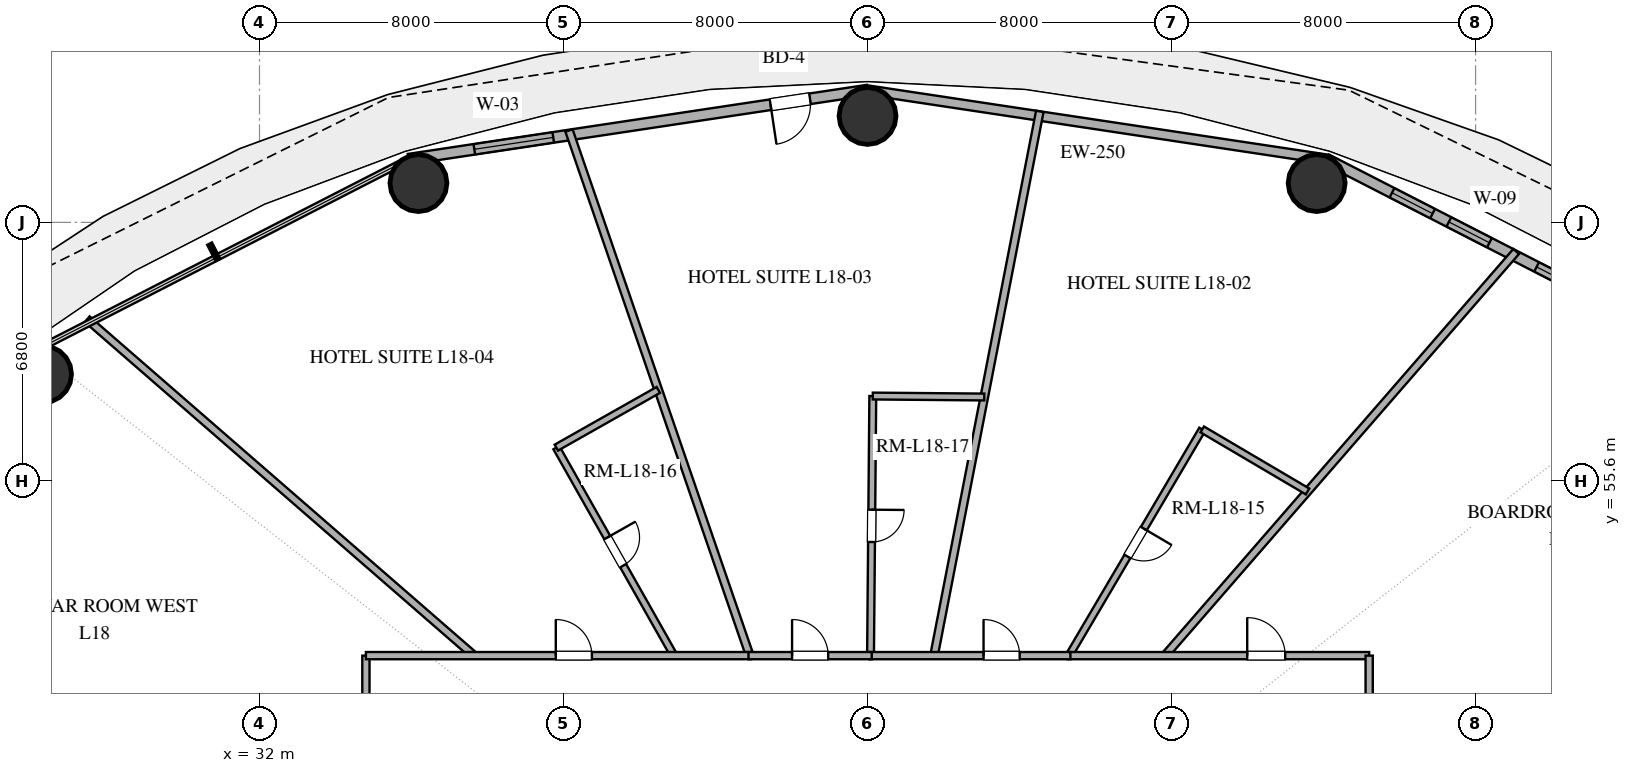
"""IFC4 building model, lengths in metres.
Left out: names, types, materials, properties, quantities, classifications, styles, units other than length and angle.
Written with IfcOpenShell. Run it as: python <this file> out.ifc"""

import sys

from ifc_helpers import new_model, si_unit, direction, frame, frame_2d, origin, origin_2d, place, context, subcontext, project, spatial, rectangle, hollow_circle, extrude, element, fill, save


model = new_model("IFC4")
c1 = context("Model", 3, precision=1e-05, world=origin(), true_north=direction((0.0, 1.0)))
c2 = subcontext(c1, "Body", "Model", "MODEL_VIEW")
j1 = project(units=[si_unit("LENGTHUNIT", "METRE"), si_unit("PLANEANGLEUNIT", "RADIAN")], contexts=[c1])
p1 = place(None, origin())
s1 = spatial("IfcSite", under=j1, at=p1, CompositionType="ELEMENT")
p2 = place(p1, origin())
s2 = spatial("IfcBuilding", under=s1, at=p2, CompositionType="ELEMENT")
p3 = place(p2, frame((0.0, 0.0, 75.0)))
s3 = spatial("IfcBuildingStorey", under=s2, at=p3, CompositionType="ELEMENT", Elevation=75.0)
for number, where, z_axis, x_axis in (
    (1, (59.818, 63.434, 0.0), (0.0, 0.0, 1.0), (1.0, 0.0, 0.0)),
    (2, (48.0, 65.2, 0.0), (0.0, 0.0, 1.0), (1.0, 0.0, 0.0)),
    (3, (36.182, 63.434, 0.0), (0.0, 0.0, 1.0), (1.0, 0.0, 0.0)),
    (4, (26.303, 58.405, 0.0), (0.0, 0.0, 1.0), (1.0, 0.0, 0.0)),
):
    element("IfcColumn", number, at=place(p3, frame(where, z_axis=z_axis, x_axis=x_axis)), inside=s3, PredefinedType="COLUMN", context=c2, shape_type="SweptSolid", body=[
        extrude(hollow_circle(Radius=0.75, WallThickness=0.04, at=origin_2d()), origin(), (0.0, 0.0, 1.0), 3.25),
    ])
p4 = place(p3, frame((70.174, 58.886, 0.0), z_axis=(0.0, 0.0, 1.0), x_axis=(-0.889853976658, 0.456245438581, 0.0)))
e5 = element("IfcWall", 5, at=p4, inside=s3, PredefinedType="SOLIDWALL", context=c2, shape_type="SweptSolid", body=[
    extrude(rectangle(XDim=11.346, YDim=0.28, at=frame_2d((5.673, 0.0))), origin(), (0.0, 0.0, 1.0), 3.25),
])
p5 = place(p4, frame((2.02, 0.0, 0.85)))
e6 = element("IfcOpeningElement", 6, at=p5, cuts=e5, PredefinedType="OPENING", context=c2, shape_type="SweptSolid", body=[
    extrude(rectangle(XDim=1.35, YDim=1.8, at=frame_2d((0.675, 0.9))), frame((0.0, 0.15, 0.0), z_axis=(0.0, -1.0, 0.0), x_axis=(1.0, 0.0, 0.0)), (0.0, 0.0, 1.0), 0.3),
])
p6 = place(p4, frame((3.784, 0.0, 0.85)))
e7 = element("IfcOpeningElement", 7, at=p6, cuts=e5, PredefinedType="OPENING", context=c2, shape_type="SweptSolid", body=[
    extrude(rectangle(XDim=1.35, YDim=1.8, at=frame_2d((0.675, 0.9))), frame((0.0, 0.15, 0.0), z_axis=(0.0, -1.0, 0.0), x_axis=(1.0, 0.0, 0.0)), (0.0, 0.0, 1.0), 0.3),
])
p7 = place(p4, frame((6.529, 0.0, 0.85)))
e8 = element("IfcOpeningElement", 8, at=p7, cuts=e5, PredefinedType="OPENING", context=c2, shape_type="SweptSolid", body=[
    extrude(rectangle(XDim=1.2, YDim=1.8, at=frame_2d((0.6, 0.9))), frame((0.0, 0.15, 0.0), z_axis=(0.0, -1.0, 0.0), x_axis=(1.0, 0.0, 0.0)), (0.0, 0.0, 1.0), 0.3),
])
p8 = place(p4, frame((8.21, 0.0, 0.85)))
e9 = element("IfcOpeningElement", 9, at=p8, cuts=e5, PredefinedType="OPENING", context=c2, shape_type="SweptSolid", body=[
    extrude(rectangle(XDim=1.2, YDim=1.8, at=frame_2d((0.6, 0.9))), frame((0.0, 0.15, 0.0), z_axis=(0.0, -1.0, 0.0), x_axis=(1.0, 0.0, 0.0)), (0.0, 0.0, 1.0), 0.3),
])
p9 = place(p3, frame((60.078, 64.062, 0.0), z_axis=(0.0, 0.0, 1.0), x_axis=(-0.988864835849, 0.148816452121, 0.0)))
e10 = element("IfcWall", 10, at=p9, inside=s3, PredefinedType="SOLIDWALL", context=c2, shape_type="SweptSolid", body=[
    extrude(rectangle(XDim=12.214, YDim=0.25, at=frame_2d((6.107, 0.0))), origin(), (0.0, 0.0, 1.0), 3.25),
])
p10 = place(p3, frame((48.0, 65.88, 0.0), z_axis=(0.0, 0.0, 1.0), x_axis=(-0.988864835849, -0.148816452121, 0.0)))
e11 = element("IfcWall", 11, at=p10, inside=s3, PredefinedType="SOLIDWALL", context=c2, shape_type="SweptSolid", body=[
    extrude(rectangle(XDim=12.214, YDim=0.28, at=frame_2d((6.107, 0.0))), origin(), (0.0, 0.0, 1.0), 3.25),
])
p11 = place(p10, frame((1.531, 0.0, 0.0)))
e12 = element("IfcOpeningElement", 12, at=p11, cuts=e11, PredefinedType="OPENING", context=c2, shape_type="SweptSolid", body=[
    extrude(rectangle(XDim=1.05, YDim=2.2, at=frame_2d((0.525, 1.1))), frame((0.0, 0.15, 0.0), z_axis=(0.0, -1.0, 0.0), x_axis=(1.0, 0.0, 0.0)), (0.0, 0.0, 1.0), 0.3),
])
p12 = place(p10, frame((8.364, 0.0, 0.85)))
e13 = element("IfcOpeningElement", 13, at=p12, cuts=e11, PredefinedType="OPENING", context=c2, shape_type="SweptSolid", body=[
    extrude(rectangle(XDim=2.1, YDim=2.2, at=frame_2d((1.05, 1.1))), frame((0.0, 0.15, 0.0), z_axis=(0.0, -1.0, 0.0), x_axis=(1.0, 0.0, 0.0)), (0.0, 0.0, 1.0), 0.3),
])
p13 = place(p3, frame((61.2, 46.545, 0.0), z_axis=(0.0, 0.0, 1.0), x_axis=(0.945518845989, 0.325567369186, 0.0)))
e14 = element("IfcWall", 14, at=p13, inside=s3, PredefinedType="PARTITIONING", context=c2, shape_type="SweptSolid", body=[
    extrude(rectangle(XDim=15.909, YDim=0.2, at=frame_2d((7.955, 0.0))), origin(), (0.0, 0.0, 1.0), 2.61),
])
p14 = place(p3, frame((37.647, 51.0, 0.0), z_axis=(0.0, 0.0, 1.0), x_axis=(-0.754713815472, 0.656054156862, 0.0)))
e15 = element("IfcWall", 15, at=p14, inside=s3, PredefinedType="PARTITIONING", context=c2, shape_type="SweptSolid", body=[
    extrude(rectangle(XDim=13.491, YDim=0.2, at=frame_2d((6.746, 0.0))), origin(), (0.0, 0.0, 1.0), 2.61),
])
p15 = place(p3, frame((55.823, 51.0, 0.0), z_axis=(0.0, 0.0, 1.0), x_axis=(0.656066321773, 0.754703240641, 0.0)))
e16 = element("IfcWall", 16, at=p15, inside=s3, PredefinedType="PARTITIONING", context=c2, shape_type="SweptSolid", body=[
    extrude(rectangle(XDim=14.091, YDim=0.2, at=frame_2d((7.045, 0.0))), origin(), (0.0, 0.0, 1.0), 2.61),
])
p16 = place(p3, frame((49.749, 51.0, 0.0), z_axis=(0.0, 0.0, 1.0), x_axis=(0.190815454206, 0.981625927956, 0.0)))
e17 = element("IfcWall", 17, at=p16, inside=s3, PredefinedType="PARTITIONING", context=c2, shape_type="SweptSolid", body=[
    extrude(rectangle(XDim=14.587, YDim=0.2, at=frame_2d((7.293, 0.0))), origin(), (0.0, 0.0, 1.0), 2.61),
])
p17 = place(p3, frame((44.901, 51.0, 0.0), z_axis=(0.0, 0.0, 1.0), x_axis=(-0.325569992405, 0.945517942741, 0.0)))
e18 = element("IfcWall", 18, at=p17, inside=s3, PredefinedType="PARTITIONING", context=c2, shape_type="SweptSolid", body=[
    extrude(rectangle(XDim=14.613, YDim=0.2, at=frame_2d((7.307, 0.0))), origin(), (0.0, 0.0, 1.0), 2.61),
])
p18 = place(p3, frame((56.807, 56.952, 0.0), z_axis=(0.0, 0.0, 1.0), x_axis=(-0.507529744585, -0.861634236995, 0.0)))
e19 = element("IfcWall", 19, at=p18, inside=s3, PredefinedType="PLUMBINGWALL", context=c2, shape_type="SweptSolid", body=[
    extrude(rectangle(XDim=6.908, YDim=0.18, at=frame_2d((3.454, 0.0))), origin(), (0.0, 0.0, 1.0), 2.61),
])
p19 = place(p18, frame((3.029, 0.0, 0.0)))
e20 = element("IfcOpeningElement", 20, at=p19, cuts=e19, PredefinedType="OPENING", context=c2, shape_type="SweptSolid", body=[
    extrude(rectangle(XDim=0.85, YDim=2.1, at=frame_2d((0.425, 1.05))), frame((0.0, 0.1, 0.0), z_axis=(0.0, -1.0, 0.0), x_axis=(1.0, 0.0, 0.0)), (0.0, 0.0, 1.0), 0.2),
])
p20 = place(p3, frame((48.138, 57.83, 0.0), z_axis=(0.0, 0.0, 1.0), x_axis=(-0.008721118088, -0.999961970327, 0.0)))
e21 = element("IfcWall", 21, at=p20, inside=s3, PredefinedType="PLUMBINGWALL", context=c2, shape_type="SweptSolid", body=[
    extrude(rectangle(XDim=6.831, YDim=0.18, at=frame_2d((3.415, 0.0))), origin(), (0.0, 0.0, 1.0), 2.61),
])
p21 = place(p20, frame((2.99, 0.0, 0.0)))
e22 = element("IfcOpeningElement", 22, at=p21, cuts=e21, PredefinedType="OPENING", context=c2, shape_type="SweptSolid", body=[
    extrude(rectangle(XDim=0.85, YDim=2.1, at=frame_2d((0.425, 1.05))), frame((0.0, 0.1, 0.0), z_axis=(0.0, -1.0, 0.0), x_axis=(1.0, 0.0, 0.0)), (0.0, 0.0, 1.0), 0.2),
])
p22 = place(p3, frame((34.8, 42.083, 0.0), z_axis=(0.0, 0.0, 1.0), x_axis=(0.0, 1.0, 0.0)))
e23 = element("IfcWall", 23, at=p22, inside=s3, PredefinedType="PARTITIONING", context=c2, shape_type="SweptSolid", body=[
    extrude(rectangle(XDim=8.917, YDim=0.19, at=frame_2d((4.458, 0.0))), origin(), (0.0, 0.0, 1.0), 2.61),
])
p23 = place(p22, frame((5.183, 0.0, 0.0)))
e24 = element("IfcOpeningElement", 24, at=p23, cuts=e23, PredefinedType="OPENING", context=c2, shape_type="SweptSolid", body=[
    extrude(rectangle(XDim=1.0, YDim=2.2, at=frame_2d((0.5, 1.1))), frame((0.0, 0.105, 0.0), z_axis=(0.0, -1.0, 0.0), x_axis=(1.0, 0.0, 0.0)), (0.0, 0.0, 1.0), 0.21),
])
p24 = place(p3, frame((39.811, 56.473, 0.0), z_axis=(0.0, 0.0, 1.0), x_axis=(0.492421798109, -0.870356692826, 0.0)))
e25 = element("IfcWall", 25, at=p24, inside=s3, PredefinedType="PLUMBINGWALL", context=c2, shape_type="SweptSolid", body=[
    extrude(rectangle(XDim=6.289, YDim=0.18, at=frame_2d((3.144, 0.0))), origin(), (0.0, 0.0, 1.0), 2.61),
])
p25 = place(p24, frame((2.719, 0.0, 0.0)))
e26 = element("IfcOpeningElement", 26, at=p25, cuts=e25, PredefinedType="OPENING", context=c2, shape_type="SweptSolid", body=[
    extrude(rectangle(XDim=0.85, YDim=2.1, at=frame_2d((0.425, 1.05))), frame((0.0, 0.1, 0.0), z_axis=(0.0, -1.0, 0.0), x_axis=(1.0, 0.0, 0.0)), (0.0, 0.0, 1.0), 0.2),
])
p26 = place(p3, frame((53.264, 51.0, 0.0), z_axis=(0.0, 0.0, 1.0), x_axis=(1.0, 0.0, 0.0)))
e27 = element("IfcWall", 27, at=p26, inside=s3, PredefinedType="PARTITIONING", context=c2, shape_type="SweptSolid", body=[
    extrude(rectangle(XDim=7.936, YDim=0.19, at=frame_2d((3.968, 0.0))), origin(), (0.0, 0.0, 1.0), 2.61),
])
p27 = place(p26, frame((4.726, 0.0, 0.0)))
e28 = element("IfcOpeningElement", 28, at=p27, cuts=e27, PredefinedType="OPENING", context=c2, shape_type="SweptSolid", body=[
    extrude(rectangle(XDim=1.0, YDim=2.2, at=frame_2d((0.5, 1.1))), frame((0.0, 0.105, 0.0), z_axis=(0.0, -1.0, 0.0), x_axis=(1.0, 0.0, 0.0)), (0.0, 0.0, 1.0), 0.21),
])
p28 = place(p3, frame((34.8, 51.0, 0.0), z_axis=(0.0, 0.0, 1.0), x_axis=(1.0, 0.0, 0.0)))
e29 = element("IfcWall", 29, at=p28, inside=s3, PredefinedType="PARTITIONING", context=c2, shape_type="SweptSolid", body=[
    extrude(rectangle(XDim=10.135, YDim=0.19, at=frame_2d((5.067, 0.0))), origin(), (0.0, 0.0, 1.0), 2.61),
])
p29 = place(p28, frame((4.996, 0.0, 0.0)))
e30 = element("IfcOpeningElement", 30, at=p29, cuts=e29, PredefinedType="OPENING", context=c2, shape_type="SweptSolid", body=[
    extrude(rectangle(XDim=0.95, YDim=2.15, at=frame_2d((0.475, 1.075))), frame((0.0, 0.105, 0.0), z_axis=(0.0, -1.0, 0.0), x_axis=(1.0, 0.0, 0.0)), (0.0, 0.0, 1.0), 0.21),
])
p30 = place(p3, frame((61.2, 51.0, 0.0), z_axis=(0.0, 0.0, 1.0), x_axis=(0.0, -1.0, 0.0)))
e31 = element("IfcWall", 31, at=p30, inside=s3, PredefinedType="PARTITIONING", context=c2, shape_type="SweptSolid", body=[
    extrude(rectangle(XDim=9.147, YDim=0.19, at=frame_2d((4.574, 0.0))), origin(), (0.0, 0.0, 1.0), 2.61),
])
p31 = place(p30, frame((6.309, 0.0, 0.0)))
e32 = element("IfcOpeningElement", 32, at=p31, cuts=e31, PredefinedType="OPENING", context=c2, shape_type="SweptSolid", body=[
    extrude(rectangle(XDim=0.95, YDim=2.15, at=frame_2d((0.475, 1.075))), frame((0.0, 0.105, 0.0), z_axis=(0.0, -1.0, 0.0), x_axis=(1.0, 0.0, 0.0)), (0.0, 0.0, 1.0), 0.21),
])
p32 = place(p3, frame((48.046, 51.0, 0.0), z_axis=(0.0, 0.0, 1.0), x_axis=(1.0, 0.0, 0.0)))
e33 = element("IfcWall", 33, at=p32, inside=s3, PredefinedType="PARTITIONING", context=c2, shape_type="SweptSolid", body=[
    extrude(rectangle(XDim=5.292, YDim=0.19, at=frame_2d((2.646, 0.0))), origin(), (0.0, 0.0, 1.0), 2.61),
])
p33 = place(p32, frame((3.006, 0.0, 0.0)))
e34 = element("IfcOpeningElement", 34, at=p33, cuts=e33, PredefinedType="OPENING", context=c2, shape_type="SweptSolid", body=[
    extrude(rectangle(XDim=0.95, YDim=2.15, at=frame_2d((0.475, 1.075))), frame((0.0, 0.105, 0.0), z_axis=(0.0, -1.0, 0.0), x_axis=(1.0, 0.0, 0.0)), (0.0, 0.0, 1.0), 0.21),
])
p34 = place(p3, frame((44.867, 51.0, 0.0), z_axis=(0.0, 0.0, 1.0), x_axis=(1.0, 0.0, 0.0)))
e35 = element("IfcWall", 35, at=p34, inside=s3, PredefinedType="PARTITIONING", context=c2, shape_type="SweptSolid", body=[
    extrude(rectangle(XDim=3.243, YDim=0.19, at=frame_2d((1.622, 0.0))), origin(), (0.0, 0.0, 1.0), 2.61),
])
p35 = place(p34, frame((1.146, 0.0, 0.0)))
e36 = element("IfcOpeningElement", 36, at=p35, cuts=e35, PredefinedType="OPENING", context=c2, shape_type="SweptSolid", body=[
    extrude(rectangle(XDim=0.95, YDim=2.15, at=frame_2d((0.475, 1.075))), frame((0.0, 0.105, 0.0), z_axis=(0.0, -1.0, 0.0), x_axis=(1.0, 0.0, 0.0)), (0.0, 0.0, 1.0), 0.21),
])
p36 = place(p3, frame((59.579, 55.32, 0.0), z_axis=(0.0, 0.0, 1.0), x_axis=(-0.861637458593, 0.507524275232, 0.0)))
e37 = element("IfcWall", 37, at=p36, inside=s3, PredefinedType="PLUMBINGWALL", context=c2, shape_type="SweptSolid", body=[
    extrude(rectangle(XDim=3.216, YDim=0.18, at=frame_2d((1.608, 0.0))), origin(), (0.0, 0.0, 1.0), 2.61),
])
p37 = place(p3, frame((42.494, 57.991, 0.0), z_axis=(0.0, 0.0, 1.0), x_axis=(-0.87034589465, -0.492440883422, 0.0)))
e38 = element("IfcWall", 38, at=p37, inside=s3, PredefinedType="PLUMBINGWALL", context=c2, shape_type="SweptSolid", body=[
    extrude(rectangle(XDim=3.082, YDim=0.18, at=frame_2d((1.541, 0.0))), origin(), (0.0, 0.0, 1.0), 2.61),
])
p38 = place(p3, frame((51.072, 57.805, 0.0), z_axis=(0.0, 0.0, 1.0), x_axis=(-0.999961829169, 0.00873728818, 0.0)))
e39 = element("IfcWall", 39, at=p38, inside=s3, PredefinedType="PLUMBINGWALL", context=c2, shape_type="SweptSolid", body=[
    extrude(rectangle(XDim=2.934, YDim=0.18, at=frame_2d((1.467, 0.0))), origin(), (0.0, 0.0, 1.0), 2.61),
])
p39 = place(p6, origin())
e40 = element("IfcWindow", 40, at=p39, inside=s3, PartitioningType="SINGLE_PANEL", PredefinedType="WINDOW", context=c2, shape_type="SweptSolid", body=[
    extrude(rectangle(XDim=1.35, YDim=1.8, at=frame_2d((0.675, 0.9))), frame((0.0, 0.03, 0.0), z_axis=(0.0, -1.0, 0.0), x_axis=(1.0, 0.0, 0.0)), (0.0, 0.0, 1.0), 0.06),
])
fill(e7, e40)
p40 = place(p7, origin())
e41 = element("IfcWindow", 41, at=p40, inside=s3, PartitioningType="SINGLE_PANEL", PredefinedType="WINDOW", context=c2, shape_type="SweptSolid", body=[
    extrude(rectangle(XDim=1.2, YDim=1.8, at=frame_2d((0.6, 0.9))), frame((0.0, 0.03, 0.0), z_axis=(0.0, -1.0, 0.0), x_axis=(1.0, 0.0, 0.0)), (0.0, 0.0, 1.0), 0.06),
])
fill(e8, e41)
p41 = place(p8, origin())
e42 = element("IfcWindow", 42, at=p41, inside=s3, PartitioningType="SINGLE_PANEL", PredefinedType="WINDOW", context=c2, shape_type="SweptSolid", body=[
    extrude(rectangle(XDim=1.2, YDim=1.8, at=frame_2d((0.6, 0.9))), frame((0.0, 0.03, 0.0), z_axis=(0.0, -1.0, 0.0), x_axis=(1.0, 0.0, 0.0)), (0.0, 0.0, 1.0), 0.06),
])
fill(e9, e42)
p42 = place(p11, origin())
e43 = element("IfcDoor", 43, at=p42, inside=s3, OperationType="SINGLE_SWING_RIGHT", PredefinedType="DOOR", context=c2, shape_type="SweptSolid", body=[
    extrude(rectangle(XDim=1.05, YDim=2.2, at=frame_2d((0.525, 1.1))), frame((0.0, 0.025, 0.0), z_axis=(0.0, -1.0, 0.0), x_axis=(1.0, 0.0, 0.0)), (0.0, 0.0, 1.0), 0.05),
])
fill(e12, e43)
p43 = place(p12, origin())
e44 = element("IfcWindow", 44, at=p43, inside=s3, PartitioningType="SINGLE_PANEL", PredefinedType="WINDOW", context=c2, shape_type="SweptSolid", body=[
    extrude(rectangle(XDim=2.1, YDim=2.2, at=frame_2d((1.05, 1.1))), frame((0.0, 0.03, 0.0), z_axis=(0.0, -1.0, 0.0), x_axis=(1.0, 0.0, 0.0)), (0.0, 0.0, 1.0), 0.06),
])
fill(e13, e44)
p44 = place(p19, origin())
e45 = element("IfcDoor", 45, at=p44, inside=s3, OperationType="SINGLE_SWING_LEFT", PredefinedType="DOOR", context=c2, shape_type="SweptSolid", body=[
    extrude(rectangle(XDim=0.85, YDim=2.1, at=frame_2d((0.425, 1.05))), frame((0.0, 0.025, 0.0), z_axis=(0.0, -1.0, 0.0), x_axis=(1.0, 0.0, 0.0)), (0.0, 0.0, 1.0), 0.05),
])
fill(e20, e45)
p45 = place(p21, origin())
e46 = element("IfcDoor", 46, at=p45, inside=s3, OperationType="SINGLE_SWING_LEFT", PredefinedType="DOOR", context=c2, shape_type="SweptSolid", body=[
    extrude(rectangle(XDim=0.85, YDim=2.1, at=frame_2d((0.425, 1.05))), frame((0.0, 0.025, 0.0), z_axis=(0.0, -1.0, 0.0), x_axis=(1.0, 0.0, 0.0)), (0.0, 0.0, 1.0), 0.05),
])
fill(e22, e46)
p46 = place(p25, origin())
e47 = element("IfcDoor", 47, at=p46, inside=s3, OperationType="SINGLE_SWING_LEFT", PredefinedType="DOOR", context=c2, shape_type="SweptSolid", body=[
    extrude(rectangle(XDim=0.85, YDim=2.1, at=frame_2d((0.425, 1.05))), frame((0.0, 0.025, 0.0), z_axis=(0.0, -1.0, 0.0), x_axis=(1.0, 0.0, 0.0)), (0.0, 0.0, 1.0), 0.05),
])
fill(e26, e47)
p47 = place(p27, origin())
e48 = element("IfcDoor", 48, at=p47, inside=s3, OperationType="SINGLE_SWING_LEFT", PredefinedType="DOOR", context=c2, shape_type="SweptSolid", body=[
    extrude(rectangle(XDim=1.0, YDim=2.2, at=frame_2d((0.5, 1.1))), frame((0.0, 0.025, 0.0), z_axis=(0.0, -1.0, 0.0), x_axis=(1.0, 0.0, 0.0)), (0.0, 0.0, 1.0), 0.05),
])
fill(e28, e48)
p48 = place(p29, origin())
e49 = element("IfcDoor", 49, at=p48, inside=s3, OperationType="SINGLE_SWING_LEFT", PredefinedType="DOOR", context=c2, shape_type="SweptSolid", body=[
    extrude(rectangle(XDim=0.95, YDim=2.15, at=frame_2d((0.475, 1.075))), frame((0.0, 0.025, 0.0), z_axis=(0.0, -1.0, 0.0), x_axis=(1.0, 0.0, 0.0)), (0.0, 0.0, 1.0), 0.05),
])
fill(e30, e49)
p49 = place(p33, origin())
e50 = element("IfcDoor", 50, at=p49, inside=s3, OperationType="SINGLE_SWING_LEFT", PredefinedType="DOOR", context=c2, shape_type="SweptSolid", body=[
    extrude(rectangle(XDim=0.95, YDim=2.15, at=frame_2d((0.475, 1.075))), frame((0.0, 0.025, 0.0), z_axis=(0.0, -1.0, 0.0), x_axis=(1.0, 0.0, 0.0)), (0.0, 0.0, 1.0), 0.05),
])
fill(e34, e50)
p50 = place(p35, origin())
e51 = element("IfcDoor", 51, at=p50, inside=s3, OperationType="SINGLE_SWING_LEFT", PredefinedType="DOOR", context=c2, shape_type="SweptSolid", body=[
    extrude(rectangle(XDim=0.95, YDim=2.15, at=frame_2d((0.475, 1.075))), frame((0.0, 0.025, 0.0), z_axis=(0.0, -1.0, 0.0), x_axis=(1.0, 0.0, 0.0)), (0.0, 0.0, 1.0), 0.05),
])
fill(e36, e51)
save(model, sys.argv[1])
